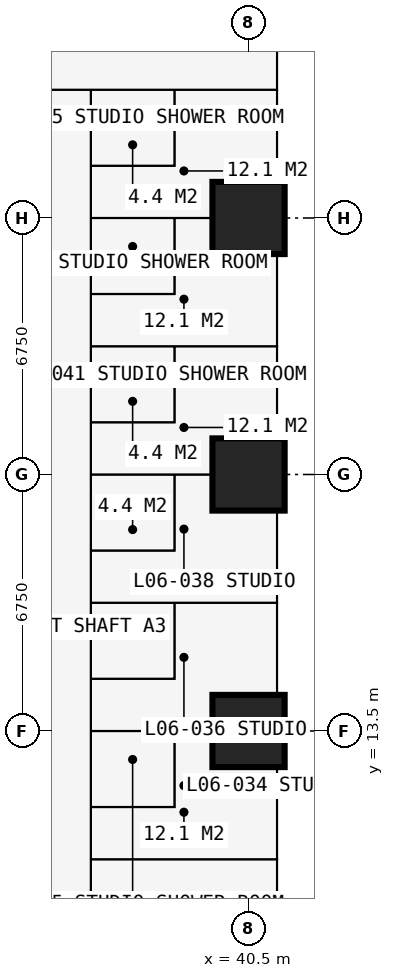
"""IFC4 building model, lengths in metres.
Left out: names, types, materials, properties, quantities, classifications, styles, units other than length and angle.
Written with IfcOpenShell. Run it as: python <this file> out.ifc"""

import sys

from ifc_helpers import new_model, si_unit, direction, frame, frame_2d, origin, origin_2d, place, context, subcontext, project, spatial, rectangle, extrude, element, fill, save


model = new_model("IFC4")
c1 = context("Model", 3, precision=1e-05, world=origin(), true_north=direction((0.0, 1.0)))
c2 = subcontext(c1, "Body", "Model", "MODEL_VIEW")
j1 = project(units=[si_unit("LENGTHUNIT", "METRE"), si_unit("PLANEANGLEUNIT", "RADIAN")], contexts=[c1])
p1 = place(None, origin())
s1 = spatial("IfcSite", under=j1, at=p1, CompositionType="ELEMENT")
p2 = place(p1, origin())
s2 = spatial("IfcBuilding", under=s1, at=p2, CompositionType="ELEMENT")
p3 = place(p2, frame((0.0, 0.0, 25.2)))
s3 = spatial("IfcBuildingStorey", under=s2, at=p3, CompositionType="ELEMENT", Elevation=25.2)
for number, where, z_axis, x_axis in (
    (1, (40.5, 13.5, 0.0), (0.0, 0.0, 1.0), (1.0, 0.0, 0.0)),
    (2, (40.5, 20.25, 0.0), (0.0, 0.0, 1.0), (1.0, 0.0, 0.0)),
    (3, (40.5, 27.0, 0.0), (0.0, 0.0, 1.0), (1.0, 0.0, 0.0)),
):
    element("IfcColumn", number, at=place(p3, frame(where, z_axis=z_axis, x_axis=x_axis)), inside=s3, PredefinedType="COLUMN", context=c2, shape_type="SweptSolid", body=[
        extrude(rectangle(XDim=1.9, YDim=1.9, at=origin_2d()), origin(), (0.0, 0.0, 1.0), 3.6),
    ])
p4 = place(p3, frame((41.25, 20.25, 0.0), z_axis=(0.0, 0.0, 1.0), x_axis=(0.0, -1.0, 0.0)))
e4 = element("IfcWall", 4, at=p4, inside=s3, PredefinedType="SOLIDWALL", context=c2, shape_type="SweptSolid", body=[
    extrude(rectangle(XDim=6.75, YDim=0.15, at=frame_2d((3.375, 0.0))), origin(), (0.0, 0.0, 1.0), 3.375),
])
p5 = place(p4, frame((0.996, 0.0, 0.0)))
e5 = element("IfcOpeningElement", 5, at=p5, cuts=e4, PredefinedType="OPENING", context=c2, shape_type="SweptSolid", body=[
    extrude(rectangle(XDim=1.0, YDim=2.2, at=frame_2d((0.5, 1.1))), frame((0.0, 0.085, 0.0), z_axis=(0.0, -1.0, 0.0), x_axis=(1.0, 0.0, 0.0)), (0.0, 0.0, 1.0), 0.17),
])
p6 = place(p4, frame((2.042, 0.0, 0.9)))
e6 = element("IfcOpeningElement", 6, at=p6, cuts=e4, PredefinedType="OPENING", context=c2, shape_type="SweptSolid", body=[
    extrude(rectangle(XDim=1.2, YDim=1.8, at=frame_2d((0.6, 0.9))), frame((0.0, 0.085, 0.0), z_axis=(0.0, -1.0, 0.0), x_axis=(1.0, 0.0, 0.0)), (0.0, 0.0, 1.0), 0.17),
])
p7 = place(p4, frame((4.754, 0.0, 0.0)))
e7 = element("IfcOpeningElement", 7, at=p7, cuts=e4, PredefinedType="OPENING", context=c2, shape_type="SweptSolid", body=[
    extrude(rectangle(XDim=1.0, YDim=2.2, at=frame_2d((0.5, 1.1))), frame((0.0, 0.085, 0.0), z_axis=(0.0, -1.0, 0.0), x_axis=(1.0, 0.0, 0.0)), (0.0, 0.0, 1.0), 0.17),
])
p8 = place(p4, frame((3.508, 0.0, 0.9)))
e8 = element("IfcOpeningElement", 8, at=p8, cuts=e4, PredefinedType="OPENING", context=c2, shape_type="SweptSolid", body=[
    extrude(rectangle(XDim=1.2, YDim=1.8, at=frame_2d((0.6, 0.9))), frame((0.0, 0.085, 0.0), z_axis=(0.0, -1.0, 0.0), x_axis=(1.0, 0.0, 0.0)), (0.0, 0.0, 1.0), 0.17),
])
p9 = place(p3, frame((41.35, 16.875, 0.0), z_axis=(0.0, 0.0, 1.0), x_axis=(1.0, 0.0, 0.0)))
e9 = element("IfcWall", 9, at=p9, inside=s3, PredefinedType="USERDEFINED", context=c2, shape_type="SweptSolid", body=[
    extrude(rectangle(XDim=2.2, YDim=1.0, at=frame_2d((1.1, 0.0))), origin(), (0.0, 0.0, 1.0), 0.9),
])
p10 = place(p3, frame((30.375, 30.375, 0.0), z_axis=(0.0, 0.0, 1.0), x_axis=(1.0, 0.0, 0.0)))
e10 = element("IfcWall", 10, at=p10, inside=s3, PredefinedType="PARTITIONING", context=c2, shape_type="SweptSolid", body=[
    extrude(rectangle(XDim=10.859, YDim=0.15, at=frame_2d((5.429, 0.0))), origin(), (0.0, 0.0, 1.0), 3.375),
])
p11 = place(p3, frame((36.35, 6.75, 0.0), z_axis=(0.0, 0.0, 1.0), x_axis=(0.0, 1.0, 0.0)))
e11 = element("IfcWall", 11, at=p11, inside=s3, PredefinedType="PARTITIONING", context=c2, shape_type="SweptSolid", body=[
    extrude(rectangle(XDim=23.625, YDim=0.1, at=frame_2d((11.812, 0.0))), origin(), (0.0, 0.0, 1.0), 3.375),
])
p12 = place(p11, frame((3.575, 0.0, 0.0)))
e12 = element("IfcOpeningElement", 12, at=p12, cuts=e11, PredefinedType="OPENING", context=c2, shape_type="SweptSolid", body=[
    extrude(rectangle(XDim=0.95, YDim=2.2, at=frame_2d((0.475, 1.1))), frame((0.0, 0.06, 0.0), z_axis=(0.0, -1.0, 0.0), x_axis=(1.0, 0.0, 0.0)), (0.0, 0.0, 1.0), 0.12),
])
p13 = place(p11, frame((7.0, 0.0, 0.0)))
e13 = element("IfcOpeningElement", 13, at=p13, cuts=e11, PredefinedType="OPENING", context=c2, shape_type="SweptSolid", body=[
    extrude(rectangle(XDim=0.95, YDim=2.2, at=frame_2d((0.475, 1.1))), frame((0.0, 0.06, 0.0), z_axis=(0.0, -1.0, 0.0), x_axis=(1.0, 0.0, 0.0)), (0.0, 0.0, 1.0), 0.12),
])
p14 = place(p11, frame((10.375, 0.0, 0.0)))
e14 = element("IfcOpeningElement", 14, at=p14, cuts=e11, PredefinedType="OPENING", context=c2, shape_type="SweptSolid", body=[
    extrude(rectangle(XDim=0.95, YDim=2.2, at=frame_2d((0.475, 1.1))), frame((0.0, 0.06, 0.0), z_axis=(0.0, -1.0, 0.0), x_axis=(1.0, 0.0, 0.0)), (0.0, 0.0, 1.0), 0.12),
])
p15 = place(p11, frame((13.75, 0.0, 0.0)))
e15 = element("IfcOpeningElement", 15, at=p15, cuts=e11, PredefinedType="OPENING", context=c2, shape_type="SweptSolid", body=[
    extrude(rectangle(XDim=0.95, YDim=2.2, at=frame_2d((0.475, 1.1))), frame((0.0, 0.06, 0.0), z_axis=(0.0, -1.0, 0.0), x_axis=(1.0, 0.0, 0.0)), (0.0, 0.0, 1.0), 0.12),
])
p16 = place(p11, frame((17.125, 0.0, 0.0)))
e16 = element("IfcOpeningElement", 16, at=p16, cuts=e11, PredefinedType="OPENING", context=c2, shape_type="SweptSolid", body=[
    extrude(rectangle(XDim=0.95, YDim=2.2, at=frame_2d((0.475, 1.1))), frame((0.0, 0.06, 0.0), z_axis=(0.0, -1.0, 0.0), x_axis=(1.0, 0.0, 0.0)), (0.0, 0.0, 1.0), 0.12),
])
p17 = place(p11, frame((20.5, 0.0, 0.0)))
e17 = element("IfcOpeningElement", 17, at=p17, cuts=e11, PredefinedType="OPENING", context=c2, shape_type="SweptSolid", body=[
    extrude(rectangle(XDim=0.95, YDim=2.2, at=frame_2d((0.475, 1.1))), frame((0.0, 0.06, 0.0), z_axis=(0.0, -1.0, 0.0), x_axis=(1.0, 0.0, 0.0)), (0.0, 0.0, 1.0), 0.12),
])
p18 = place(p3, frame((36.35, 10.125, 0.0), z_axis=(0.0, 0.0, 1.0), x_axis=(1.0, 0.0, 0.0)))
e18 = element("IfcWall", 18, at=p18, inside=s3, PredefinedType="PARTITIONING", context=c2, shape_type="SweptSolid", body=[
    extrude(rectangle(XDim=4.884, YDim=0.15, at=frame_2d((2.442, 0.0))), origin(), (0.0, 0.0, 1.0), 3.375),
])
p19 = place(p3, frame((36.35, 11.5, 0.0), z_axis=(0.0, 0.0, 1.0), x_axis=(1.0, 0.0, 0.0)))
e19 = element("IfcWall", 19, at=p19, inside=s3, PredefinedType="PARTITIONING", context=c2, shape_type="SweptSolid", body=[
    extrude(rectangle(XDim=2.2, YDim=0.1, at=frame_2d((1.1, 0.0))), origin(), (0.0, 0.0, 1.0), 3.375),
])
p20 = place(p19, frame((0.65, 0.0, 0.0)))
e20 = element("IfcOpeningElement", 20, at=p20, cuts=e19, PredefinedType="OPENING", context=c2, shape_type="SweptSolid", body=[
    extrude(rectangle(XDim=0.9, YDim=2.2, at=frame_2d((0.45, 1.1))), frame((0.0, 0.06, 0.0), z_axis=(0.0, -1.0, 0.0), x_axis=(1.0, 0.0, 0.0)), (0.0, 0.0, 1.0), 0.12),
])
p21 = place(p3, frame((36.35, 13.5, 0.0), z_axis=(0.0, 0.0, 1.0), x_axis=(1.0, 0.0, 0.0)))
e21 = element("IfcWall", 21, at=p21, inside=s3, PredefinedType="PARTITIONING", context=c2, shape_type="SweptSolid", body=[
    extrude(rectangle(XDim=4.884, YDim=0.175, at=frame_2d((2.442, 0.0))), origin(), (0.0, 0.0, 1.0), 2.877),
])
p22 = place(p3, frame((36.35, 14.875, 0.0), z_axis=(0.0, 0.0, 1.0), x_axis=(1.0, 0.0, 0.0)))
e22 = element("IfcWall", 22, at=p22, inside=s3, PredefinedType="PARTITIONING", context=c2, shape_type="SweptSolid", body=[
    extrude(rectangle(XDim=2.2, YDim=0.1, at=frame_2d((1.1, 0.0))), origin(), (0.0, 0.0, 1.0), 3.375),
])
p23 = place(p22, frame((0.65, 0.0, 0.0)))
e23 = element("IfcOpeningElement", 23, at=p23, cuts=e22, PredefinedType="OPENING", context=c2, shape_type="SweptSolid", body=[
    extrude(rectangle(XDim=0.9, YDim=2.2, at=frame_2d((0.45, 1.1))), frame((0.0, 0.06, 0.0), z_axis=(0.0, -1.0, 0.0), x_axis=(1.0, 0.0, 0.0)), (0.0, 0.0, 1.0), 0.12),
])
p24 = place(p3, frame((36.35, 16.875, 0.0), z_axis=(0.0, 0.0, 1.0), x_axis=(1.0, 0.0, 0.0)))
e24 = element("IfcWall", 24, at=p24, inside=s3, PredefinedType="PARTITIONING", context=c2, shape_type="SweptSolid", body=[
    extrude(rectangle(XDim=4.884, YDim=0.175, at=frame_2d((2.442, 0.0))), origin(), (0.0, 0.0, 1.0), 3.375),
])
p25 = place(p3, frame((36.35, 18.25, 0.0), z_axis=(0.0, 0.0, 1.0), x_axis=(1.0, 0.0, 0.0)))
e25 = element("IfcWall", 25, at=p25, inside=s3, PredefinedType="PARTITIONING", context=c2, shape_type="SweptSolid", body=[
    extrude(rectangle(XDim=2.2, YDim=0.1, at=frame_2d((1.1, 0.0))), origin(), (0.0, 0.0, 1.0), 3.375),
])
p26 = place(p25, frame((0.65, 0.0, 0.0)))
e26 = element("IfcOpeningElement", 26, at=p26, cuts=e25, PredefinedType="OPENING", context=c2, shape_type="SweptSolid", body=[
    extrude(rectangle(XDim=0.9, YDim=2.2, at=frame_2d((0.45, 1.1))), frame((0.0, 0.06, 0.0), z_axis=(0.0, -1.0, 0.0), x_axis=(1.0, 0.0, 0.0)), (0.0, 0.0, 1.0), 0.12),
])
p27 = place(p3, frame((36.35, 20.25, 0.0), z_axis=(0.0, 0.0, 1.0), x_axis=(1.0, 0.0, 0.0)))
e27 = element("IfcWall", 27, at=p27, inside=s3, PredefinedType="PARTITIONING", context=c2, shape_type="SweptSolid", body=[
    extrude(rectangle(XDim=4.884, YDim=0.175, at=frame_2d((2.442, 0.0))), origin(), (0.0, 0.0, 1.0), 2.61),
])
p28 = place(p3, frame((36.35, 21.625, 0.0), z_axis=(0.0, 0.0, 1.0), x_axis=(1.0, 0.0, 0.0)))
e28 = element("IfcWall", 28, at=p28, inside=s3, PredefinedType="PARTITIONING", context=c2, shape_type="SweptSolid", body=[
    extrude(rectangle(XDim=2.2, YDim=0.1, at=frame_2d((1.1, 0.0))), origin(), (0.0, 0.0, 1.0), 3.375),
])
p29 = place(p28, frame((0.65, 0.0, 0.0)))
e29 = element("IfcOpeningElement", 29, at=p29, cuts=e28, PredefinedType="OPENING", context=c2, shape_type="SweptSolid", body=[
    extrude(rectangle(XDim=0.9, YDim=2.2, at=frame_2d((0.45, 1.1))), frame((0.0, 0.06, 0.0), z_axis=(0.0, -1.0, 0.0), x_axis=(1.0, 0.0, 0.0)), (0.0, 0.0, 1.0), 0.12),
])
p30 = place(p3, frame((36.35, 23.625, 0.0), z_axis=(0.0, 0.0, 1.0), x_axis=(1.0, 0.0, 0.0)))
e30 = element("IfcWall", 30, at=p30, inside=s3, PredefinedType="PARTITIONING", context=c2, shape_type="SweptSolid", body=[
    extrude(rectangle(XDim=4.884, YDim=0.175, at=frame_2d((2.442, 0.0))), origin(), (0.0, 0.0, 1.0), 3.375),
])
p31 = place(p3, frame((36.35, 25.0, 0.0), z_axis=(0.0, 0.0, 1.0), x_axis=(1.0, 0.0, 0.0)))
e31 = element("IfcWall", 31, at=p31, inside=s3, PredefinedType="PARTITIONING", context=c2, shape_type="SweptSolid", body=[
    extrude(rectangle(XDim=2.2, YDim=0.1, at=frame_2d((1.1, 0.0))), origin(), (0.0, 0.0, 1.0), 3.375),
])
p32 = place(p31, frame((0.65, 0.0, 0.0)))
e32 = element("IfcOpeningElement", 32, at=p32, cuts=e31, PredefinedType="OPENING", context=c2, shape_type="SweptSolid", body=[
    extrude(rectangle(XDim=0.9, YDim=2.2, at=frame_2d((0.45, 1.1))), frame((0.0, 0.06, 0.0), z_axis=(0.0, -1.0, 0.0), x_axis=(1.0, 0.0, 0.0)), (0.0, 0.0, 1.0), 0.12),
])
p33 = place(p3, frame((36.35, 27.0, 0.0), z_axis=(0.0, 0.0, 1.0), x_axis=(1.0, 0.0, 0.0)))
e33 = element("IfcWall", 33, at=p33, inside=s3, PredefinedType="PARTITIONING", context=c2, shape_type="SweptSolid", body=[
    extrude(rectangle(XDim=4.884, YDim=0.175, at=frame_2d((2.442, 0.0))), origin(), (0.0, 0.0, 1.0), 2.61),
])
p34 = place(p3, frame((36.35, 28.375, 0.0), z_axis=(0.0, 0.0, 1.0), x_axis=(1.0, 0.0, 0.0)))
e34 = element("IfcWall", 34, at=p34, inside=s3, PredefinedType="PARTITIONING", context=c2, shape_type="SweptSolid", body=[
    extrude(rectangle(XDim=2.2, YDim=0.1, at=frame_2d((1.1, 0.0))), origin(), (0.0, 0.0, 1.0), 3.375),
])
p35 = place(p34, frame((0.65, 0.0, 0.0)))
e35 = element("IfcOpeningElement", 35, at=p35, cuts=e34, PredefinedType="OPENING", context=c2, shape_type="SweptSolid", body=[
    extrude(rectangle(XDim=0.9, YDim=2.2, at=frame_2d((0.45, 1.1))), frame((0.0, 0.06, 0.0), z_axis=(0.0, -1.0, 0.0), x_axis=(1.0, 0.0, 0.0)), (0.0, 0.0, 1.0), 0.12),
])
for number, where, z_axis, x_axis in (
    (36, (38.55, 11.5, 0.0), (0.0, 0.0, 1.0), (0.0, 1.0, 0.0)),
    (37, (38.55, 14.875, 0.0), (0.0, 0.0, 1.0), (0.0, 1.0, 0.0)),
    (38, (38.55, 18.25, 0.0), (0.0, 0.0, 1.0), (0.0, 1.0, 0.0)),
    (39, (38.55, 21.625, 0.0), (0.0, 0.0, 1.0), (0.0, 1.0, 0.0)),
    (40, (38.55, 25.0, 0.0), (0.0, 0.0, 1.0), (0.0, 1.0, 0.0)),
    (41, (38.55, 28.375, 0.0), (0.0, 0.0, 1.0), (0.0, 1.0, 0.0)),
):
    element("IfcWall", number, at=place(p3, frame(where, z_axis=z_axis, x_axis=x_axis)), inside=s3, PredefinedType="PARTITIONING", context=c2, shape_type="SweptSolid", body=[
        extrude(rectangle(XDim=2.0, YDim=0.1, at=frame_2d((1.0, 0.0))), origin(), (0.0, 0.0, 1.0), 3.375),
    ])
p36 = place(p5, origin())
e42 = element("IfcDoor", 42, at=p36, inside=s3, OperationType="SINGLE_SWING_LEFT", PredefinedType="DOOR", context=c2, shape_type="SweptSolid", body=[
    extrude(rectangle(XDim=1.0, YDim=2.2, at=frame_2d((0.5, 1.1))), frame((0.0, 0.025, 0.0), z_axis=(0.0, -1.0, 0.0), x_axis=(1.0, 0.0, 0.0)), (0.0, 0.0, 1.0), 0.05),
])
fill(e5, e42)
p37 = place(p6, origin())
e43 = element("IfcWindow", 43, at=p37, inside=s3, PartitioningType="SINGLE_PANEL", PredefinedType="WINDOW", context=c2, shape_type="SweptSolid", body=[
    extrude(rectangle(XDim=1.2, YDim=1.8, at=frame_2d((0.6, 0.9))), frame((0.0, 0.03, 0.0), z_axis=(0.0, -1.0, 0.0), x_axis=(1.0, 0.0, 0.0)), (0.0, 0.0, 1.0), 0.06),
])
fill(e6, e43)
p38 = place(p7, origin())
e44 = element("IfcDoor", 44, at=p38, inside=s3, OperationType="SINGLE_SWING_RIGHT", PredefinedType="DOOR", context=c2, shape_type="SweptSolid", body=[
    extrude(rectangle(XDim=1.0, YDim=2.2, at=frame_2d((0.5, 1.1))), frame((0.0, 0.025, 0.0), z_axis=(0.0, -1.0, 0.0), x_axis=(1.0, 0.0, 0.0)), (0.0, 0.0, 1.0), 0.05),
])
fill(e7, e44)
p39 = place(p8, origin())
e45 = element("IfcWindow", 45, at=p39, inside=s3, PartitioningType="SINGLE_PANEL", PredefinedType="WINDOW", context=c2, shape_type="SweptSolid", body=[
    extrude(rectangle(XDim=1.2, YDim=1.8, at=frame_2d((0.6, 0.9))), frame((0.0, 0.03, 0.0), z_axis=(0.0, -1.0, 0.0), x_axis=(1.0, 0.0, 0.0)), (0.0, 0.0, 1.0), 0.06),
])
fill(e8, e45)
p40 = place(p12, origin())
e46 = element("IfcDoor", 46, at=p40, inside=s3, OperationType="SINGLE_SWING_LEFT", PredefinedType="DOOR", context=c2, shape_type="SweptSolid", body=[
    extrude(rectangle(XDim=0.95, YDim=2.2, at=frame_2d((0.475, 1.1))), frame((0.0, 0.025, 0.0), z_axis=(0.0, -1.0, 0.0), x_axis=(1.0, 0.0, 0.0)), (0.0, 0.0, 1.0), 0.05),
])
fill(e12, e46)
p41 = place(p20, origin())
e47 = element("IfcDoor", 47, at=p41, inside=s3, OperationType="SINGLE_SWING_RIGHT", PredefinedType="DOOR", context=c2, shape_type="SweptSolid", body=[
    extrude(rectangle(XDim=0.9, YDim=2.2, at=frame_2d((0.45, 1.1))), frame((0.0, 0.025, 0.0), z_axis=(0.0, -1.0, 0.0), x_axis=(1.0, 0.0, 0.0)), (0.0, 0.0, 1.0), 0.05),
])
fill(e20, e47)
p42 = place(p13, origin())
e48 = element("IfcDoor", 48, at=p42, inside=s3, OperationType="SINGLE_SWING_LEFT", PredefinedType="DOOR", context=c2, shape_type="SweptSolid", body=[
    extrude(rectangle(XDim=0.95, YDim=2.2, at=frame_2d((0.475, 1.1))), frame((0.0, 0.025, 0.0), z_axis=(0.0, -1.0, 0.0), x_axis=(1.0, 0.0, 0.0)), (0.0, 0.0, 1.0), 0.05),
])
fill(e13, e48)
p43 = place(p23, origin())
e49 = element("IfcDoor", 49, at=p43, inside=s3, OperationType="SINGLE_SWING_RIGHT", PredefinedType="DOOR", context=c2, shape_type="SweptSolid", body=[
    extrude(rectangle(XDim=0.9, YDim=2.2, at=frame_2d((0.45, 1.1))), frame((0.0, 0.025, 0.0), z_axis=(0.0, -1.0, 0.0), x_axis=(1.0, 0.0, 0.0)), (0.0, 0.0, 1.0), 0.05),
])
fill(e23, e49)
p44 = place(p14, origin())
e50 = element("IfcDoor", 50, at=p44, inside=s3, OperationType="SINGLE_SWING_LEFT", PredefinedType="DOOR", context=c2, shape_type="SweptSolid", body=[
    extrude(rectangle(XDim=0.95, YDim=2.2, at=frame_2d((0.475, 1.1))), frame((0.0, 0.025, 0.0), z_axis=(0.0, -1.0, 0.0), x_axis=(1.0, 0.0, 0.0)), (0.0, 0.0, 1.0), 0.05),
])
fill(e14, e50)
p45 = place(p26, origin())
e51 = element("IfcDoor", 51, at=p45, inside=s3, OperationType="SINGLE_SWING_RIGHT", PredefinedType="DOOR", context=c2, shape_type="SweptSolid", body=[
    extrude(rectangle(XDim=0.9, YDim=2.2, at=frame_2d((0.45, 1.1))), frame((0.0, 0.025, 0.0), z_axis=(0.0, -1.0, 0.0), x_axis=(1.0, 0.0, 0.0)), (0.0, 0.0, 1.0), 0.05),
])
fill(e26, e51)
p46 = place(p15, origin())
e52 = element("IfcDoor", 52, at=p46, inside=s3, OperationType="SINGLE_SWING_LEFT", PredefinedType="DOOR", context=c2, shape_type="SweptSolid", body=[
    extrude(rectangle(XDim=0.95, YDim=2.2, at=frame_2d((0.475, 1.1))), frame((0.0, 0.025, 0.0), z_axis=(0.0, -1.0, 0.0), x_axis=(1.0, 0.0, 0.0)), (0.0, 0.0, 1.0), 0.05),
])
fill(e15, e52)
p47 = place(p29, origin())
e53 = element("IfcDoor", 53, at=p47, inside=s3, OperationType="SINGLE_SWING_RIGHT", PredefinedType="DOOR", context=c2, shape_type="SweptSolid", body=[
    extrude(rectangle(XDim=0.9, YDim=2.2, at=frame_2d((0.45, 1.1))), frame((0.0, 0.025, 0.0), z_axis=(0.0, -1.0, 0.0), x_axis=(1.0, 0.0, 0.0)), (0.0, 0.0, 1.0), 0.05),
])
fill(e29, e53)
p48 = place(p16, origin())
e54 = element("IfcDoor", 54, at=p48, inside=s3, OperationType="SINGLE_SWING_LEFT", PredefinedType="DOOR", context=c2, shape_type="SweptSolid", body=[
    extrude(rectangle(XDim=0.95, YDim=2.2, at=frame_2d((0.475, 1.1))), frame((0.0, 0.025, 0.0), z_axis=(0.0, -1.0, 0.0), x_axis=(1.0, 0.0, 0.0)), (0.0, 0.0, 1.0), 0.05),
])
fill(e16, e54)
p49 = place(p32, origin())
e55 = element("IfcDoor", 55, at=p49, inside=s3, OperationType="SINGLE_SWING_RIGHT", PredefinedType="DOOR", context=c2, shape_type="SweptSolid", body=[
    extrude(rectangle(XDim=0.9, YDim=2.2, at=frame_2d((0.45, 1.1))), frame((0.0, 0.025, 0.0), z_axis=(0.0, -1.0, 0.0), x_axis=(1.0, 0.0, 0.0)), (0.0, 0.0, 1.0), 0.05),
])
fill(e32, e55)
p50 = place(p17, origin())
e56 = element("IfcDoor", 56, at=p50, inside=s3, OperationType="SINGLE_SWING_LEFT", PredefinedType="DOOR", context=c2, shape_type="SweptSolid", body=[
    extrude(rectangle(XDim=0.95, YDim=2.2, at=frame_2d((0.475, 1.1))), frame((0.0, 0.025, 0.0), z_axis=(0.0, -1.0, 0.0), x_axis=(1.0, 0.0, 0.0)), (0.0, 0.0, 1.0), 0.05),
])
fill(e17, e56)
p51 = place(p35, origin())
e57 = element("IfcDoor", 57, at=p51, inside=s3, OperationType="SINGLE_SWING_RIGHT", PredefinedType="DOOR", context=c2, shape_type="SweptSolid", body=[
    extrude(rectangle(XDim=0.9, YDim=2.2, at=frame_2d((0.45, 1.1))), frame((0.0, 0.025, 0.0), z_axis=(0.0, -1.0, 0.0), x_axis=(1.0, 0.0, 0.0)), (0.0, 0.0, 1.0), 0.05),
])
fill(e35, e57)
save(model, sys.argv[1])
